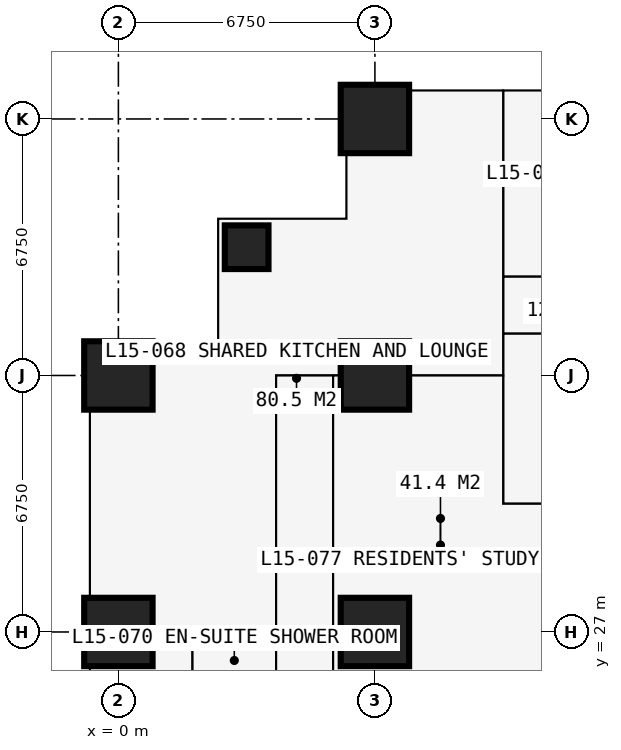
"""IFC4 building model, lengths in metres.
Left out: names, types, materials, properties, quantities, classifications, styles, units other than length and angle.
Written with IfcOpenShell. Run it as: python <this file> out.ifc"""

import sys

from ifc_helpers import new_model, si_unit, direction, frame, frame_2d, origin, origin_2d, place, context, subcontext, project, spatial, rectangle, extrude, element, fill, save


model = new_model("IFC4")
c1 = context("Model", 3, precision=1e-05, world=origin(), true_north=direction((0.0, 1.0)))
c2 = subcontext(c1, "Body", "Model", "MODEL_VIEW")
j1 = project(units=[si_unit("LENGTHUNIT", "METRE"), si_unit("PLANEANGLEUNIT", "RADIAN")], contexts=[c1])
p1 = place(None, origin())
s1 = spatial("IfcSite", under=j1, at=p1, CompositionType="ELEMENT")
p2 = place(p1, origin())
s2 = spatial("IfcBuilding", under=s1, at=p2, CompositionType="ELEMENT")
p3 = place(p2, frame((0.0, 0.0, 57.6)))
s3 = spatial("IfcBuildingStorey", under=s2, at=p3, CompositionType="ELEMENT", Elevation=57.6)
for number, where, z_axis, x_axis in (
    (1, (0.0, 27.0, 0.0), (0.0, 0.0, 1.0), (1.0, 0.0, 0.0)),
    (2, (0.0, 33.75, 0.0), (0.0, 0.0, 1.0), (1.0, 0.0, 0.0)),
):
    element("IfcColumn", number, at=place(p3, frame(where, z_axis=z_axis, x_axis=x_axis)), inside=s3, PredefinedType="COLUMN", context=c2, shape_type="SweptSolid", body=[
        extrude(rectangle(XDim=1.8, YDim=1.8, at=origin_2d()), origin(), (0.0, 0.0, 1.0), 3.6),
    ])
p4 = place(p3, frame((3.375, 37.125, 0.0), z_axis=(0.0, 0.0, 1.0), x_axis=(1.0, 0.0, 0.0)))
e3 = element("IfcColumn", 3, at=p4, inside=s3, PredefinedType="COLUMN", context=c2, shape_type="SweptSolid", body=[
    extrude(rectangle(XDim=1.15, YDim=1.15, at=origin_2d()), origin(), (0.0, 0.0, 1.0), 3.6),
])
for number, where, z_axis, x_axis in (
    (4, (6.75, 27.0, 0.0), (0.0, 0.0, 1.0), (1.0, 0.0, 0.0)),
    (5, (6.75, 33.75, 0.0), (0.0, 0.0, 1.0), (1.0, 0.0, 0.0)),
    (6, (6.75, 40.5, 0.0), (0.0, 0.0, 1.0), (1.0, 0.0, 0.0)),
):
    element("IfcColumn", number, at=place(p3, frame(where, z_axis=z_axis, x_axis=x_axis)), inside=s3, PredefinedType="COLUMN", context=c2, shape_type="SweptSolid", body=[
        extrude(rectangle(XDim=1.8, YDim=1.8, at=origin_2d()), origin(), (0.0, 0.0, 1.0), 3.6),
    ])
p5 = place(p3, frame((6.0, 41.25, 0.0), z_axis=(0.0, 0.0, 1.0), x_axis=(0.0, -1.0, 0.0)))
e7 = element("IfcWall", 7, at=p5, inside=s3, PredefinedType="SOLIDWALL", context=c2, shape_type="SweptSolid", body=[
    extrude(rectangle(XDim=3.375, YDim=0.3, at=frame_2d((1.688, 0.0))), origin(), (0.0, 0.0, 1.0), 3.375),
])
p6 = place(p5, frame((1.833, 0.0, 0.9)))
e8 = element("IfcOpeningElement", 8, at=p6, cuts=e7, PredefinedType="OPENING", context=c2, shape_type="SweptSolid", body=[
    extrude(rectangle(XDim=1.2, YDim=1.8, at=frame_2d((0.6, 0.9))), frame((0.0, 0.16, 0.0), z_axis=(0.0, -1.0, 0.0), x_axis=(1.0, 0.0, 0.0)), (0.0, 0.0, 1.0), 0.32),
])
p7 = place(p3, frame((6.0, 37.875, 0.0), z_axis=(0.0, 0.0, 1.0), x_axis=(-1.0, 0.0, 0.0)))
e9 = element("IfcWall", 9, at=p7, inside=s3, PredefinedType="SOLIDWALL", context=c2, shape_type="SweptSolid", body=[
    extrude(rectangle(XDim=3.375, YDim=0.3, at=frame_2d((1.688, 0.0))), origin(), (0.0, 0.0, 1.0), 3.375),
])
p8 = place(p7, frame((0.788, 0.0, 0.6)))
e10 = element("IfcOpeningElement", 10, at=p8, cuts=e9, PredefinedType="OPENING", context=c2, shape_type="SweptSolid", body=[
    extrude(rectangle(XDim=1.8, YDim=2.1, at=frame_2d((0.9, 1.05))), frame((0.0, 0.16, 0.0), z_axis=(0.0, -1.0, 0.0), x_axis=(1.0, 0.0, 0.0)), (0.0, 0.0, 1.0), 0.32),
])
p9 = place(p3, frame((2.625, 37.875, 0.0), z_axis=(0.0, 0.0, 1.0), x_axis=(0.0, -1.0, 0.0)))
e11 = element("IfcWall", 11, at=p9, inside=s3, PredefinedType="SOLIDWALL", context=c2, shape_type="SweptSolid", body=[
    extrude(rectangle(XDim=3.375, YDim=0.3, at=frame_2d((1.688, 0.0))), origin(), (0.0, 0.0, 1.0), 3.375),
])
p10 = place(p9, frame((0.788, 0.0, 0.6)))
e12 = element("IfcOpeningElement", 12, at=p10, cuts=e11, PredefinedType="OPENING", context=c2, shape_type="SweptSolid", body=[
    extrude(rectangle(XDim=1.8, YDim=2.1, at=frame_2d((0.9, 1.05))), frame((0.0, 0.16, 0.0), z_axis=(0.0, -1.0, 0.0), x_axis=(1.0, 0.0, 0.0)), (0.0, 0.0, 1.0), 0.32),
])
p11 = place(p3, frame((2.625, 34.5, 0.0), z_axis=(0.0, 0.0, 1.0), x_axis=(-1.0, 0.0, 0.0)))
e13 = element("IfcWall", 13, at=p11, inside=s3, PredefinedType="SOLIDWALL", context=c2, shape_type="SweptSolid", body=[
    extrude(rectangle(XDim=3.375, YDim=0.3, at=frame_2d((1.688, 0.0))), origin(), (0.0, 0.0, 1.0), 3.375),
])
p12 = place(p11, frame((0.343, 0.0, 0.9)))
e14 = element("IfcOpeningElement", 14, at=p12, cuts=e13, PredefinedType="OPENING", context=c2, shape_type="SweptSolid", body=[
    extrude(rectangle(XDim=1.2, YDim=1.8, at=frame_2d((0.6, 0.9))), frame((0.0, 0.16, 0.0), z_axis=(0.0, -1.0, 0.0), x_axis=(1.0, 0.0, 0.0)), (0.0, 0.0, 1.0), 0.32),
])
p13 = place(p3, frame((-0.75, 20.25, 0.0), z_axis=(0.0, 0.0, 1.0), x_axis=(0.0, 1.0, 0.0)))
e15 = element("IfcWall", 15, at=p13, inside=s3, PredefinedType="SOLIDWALL", context=c2, shape_type="SweptSolid", body=[
    extrude(rectangle(XDim=6.75, YDim=0.15, at=frame_2d((3.375, 0.0))), origin(), (0.0, 0.0, 1.0), 3.375),
])
p14 = place(p13, frame((0.962, 0.0, 0.0)))
e16 = element("IfcOpeningElement", 16, at=p14, cuts=e15, PredefinedType="OPENING", context=c2, shape_type="SweptSolid", body=[
    extrude(rectangle(XDim=1.0, YDim=2.2, at=frame_2d((0.5, 1.1))), frame((0.0, 0.085, 0.0), z_axis=(0.0, -1.0, 0.0), x_axis=(1.0, 0.0, 0.0)), (0.0, 0.0, 1.0), 0.17),
])
p15 = place(p13, frame((2.025, 0.0, 0.9)))
e17 = element("IfcOpeningElement", 17, at=p15, cuts=e15, PredefinedType="OPENING", context=c2, shape_type="SweptSolid", body=[
    extrude(rectangle(XDim=1.2, YDim=1.8, at=frame_2d((0.6, 0.9))), frame((0.0, 0.085, 0.0), z_axis=(0.0, -1.0, 0.0), x_axis=(1.0, 0.0, 0.0)), (0.0, 0.0, 1.0), 0.17),
])
p16 = place(p13, frame((4.788, 0.0, 0.0)))
e18 = element("IfcOpeningElement", 18, at=p16, cuts=e15, PredefinedType="OPENING", context=c2, shape_type="SweptSolid", body=[
    extrude(rectangle(XDim=1.0, YDim=2.2, at=frame_2d((0.5, 1.1))), frame((0.0, 0.085, 0.0), z_axis=(0.0, -1.0, 0.0), x_axis=(1.0, 0.0, 0.0)), (0.0, 0.0, 1.0), 0.17),
])
p17 = place(p13, frame((3.525, 0.0, 0.9)))
e19 = element("IfcOpeningElement", 19, at=p17, cuts=e15, PredefinedType="OPENING", context=c2, shape_type="SweptSolid", body=[
    extrude(rectangle(XDim=1.2, YDim=1.8, at=frame_2d((0.6, 0.9))), frame((0.0, 0.085, 0.0), z_axis=(0.0, -1.0, 0.0), x_axis=(1.0, 0.0, 0.0)), (0.0, 0.0, 1.0), 0.17),
])
p18 = place(p3, frame((-0.734, 27.0, 0.0), z_axis=(0.0, 0.0, 1.0), x_axis=(1.0, 0.0, 0.0)))
e20 = element("IfcWall", 20, at=p18, inside=s3, PredefinedType="PARTITIONING", context=c2, shape_type="SweptSolid", body=[
    extrude(rectangle(XDim=4.884, YDim=0.15, at=frame_2d((2.442, 0.0))), origin(), (0.0, 0.0, 1.0), 2.877),
])
p19 = place(p3, frame((1.95, 25.0, 0.0), z_axis=(0.0, 0.0, 1.0), x_axis=(0.0, 1.0, 0.0)))
e21 = element("IfcWall", 21, at=p19, inside=s3, PredefinedType="PARTITIONING", context=c2, shape_type="SweptSolid", body=[
    extrude(rectangle(XDim=2.0, YDim=0.1, at=frame_2d((1.0, 0.0))), origin(), (0.0, 0.0, 1.0), 3.375),
])
p20 = place(p3, frame((4.15, 10.125, 0.0), z_axis=(0.0, 0.0, 1.0), x_axis=(0.0, 1.0, 0.0)))
e22 = element("IfcWall", 22, at=p20, inside=s3, PredefinedType="PARTITIONING", context=c2, shape_type="SweptSolid", body=[
    extrude(rectangle(XDim=23.625, YDim=0.15, at=frame_2d((11.812, 0.0))), origin(), (0.0, 0.0, 1.0), 3.375),
])
p21 = place(p20, frame((19.775, 0.0, 0.0)))
e23 = element("IfcOpeningElement", 23, at=p21, cuts=e22, PredefinedType="OPENING", context=c2, shape_type="SweptSolid", body=[
    extrude(rectangle(XDim=1.0, YDim=2.2, at=frame_2d((0.5, 1.1))), frame((0.0, 0.085, 0.0), z_axis=(0.0, -1.0, 0.0), x_axis=(1.0, 0.0, 0.0)), (0.0, 0.0, 1.0), 0.17),
])
p22 = place(p20, frame((13.7, 0.0, 0.0)))
e24 = element("IfcOpeningElement", 24, at=p22, cuts=e22, PredefinedType="OPENING", context=c2, shape_type="SweptSolid", body=[
    extrude(rectangle(XDim=0.95, YDim=2.2, at=frame_2d((0.475, 1.1))), frame((0.0, 0.085, 0.0), z_axis=(0.0, -1.0, 0.0), x_axis=(1.0, 0.0, 0.0)), (0.0, 0.0, 1.0), 0.17),
])
p23 = place(p20, frame((4.2, 0.0, 0.0)))
e25 = element("IfcOpeningElement", 25, at=p23, cuts=e22, PredefinedType="OPENING", context=c2, shape_type="SweptSolid", body=[
    extrude(rectangle(XDim=0.95, YDim=2.2, at=frame_2d((0.475, 1.1))), frame((0.0, 0.085, 0.0), z_axis=(0.0, -1.0, 0.0), x_axis=(1.0, 0.0, 0.0)), (0.0, 0.0, 1.0), 0.17),
])
p24 = place(p20, frame((10.95, 0.0, 0.0)))
e26 = element("IfcOpeningElement", 26, at=p24, cuts=e22, PredefinedType="OPENING", context=c2, shape_type="SweptSolid", body=[
    extrude(rectangle(XDim=0.95, YDim=2.2, at=frame_2d((0.475, 1.1))), frame((0.0, 0.085, 0.0), z_axis=(0.0, -1.0, 0.0), x_axis=(1.0, 0.0, 0.0)), (0.0, 0.0, 1.0), 0.17),
])
p25 = place(p3, frame((4.15, 33.75, 0.0), z_axis=(0.0, 0.0, 1.0), x_axis=(1.0, 0.0, 0.0)))
e27 = element("IfcWall", 27, at=p25, inside=s3, PredefinedType="PARTITIONING", context=c2, shape_type="SweptSolid", body=[
    extrude(rectangle(XDim=5.975, YDim=0.15, at=frame_2d((2.988, 0.0))), origin(), (0.0, 0.0, 1.0), 2.877),
])
p26 = place(p3, frame((5.65, 25.725, 0.0), z_axis=(0.0, 0.0, 1.0), x_axis=(0.0, 1.0, 0.0)))
e28 = element("IfcWall", 28, at=p26, inside=s3, PredefinedType="PARTITIONING", context=c2, shape_type="SweptSolid", body=[
    extrude(rectangle(XDim=8.025, YDim=0.15, at=frame_2d((4.012, 0.0))), origin(), (0.0, 0.0, 1.0), 3.375),
])
p27 = place(p3, frame((10.125, 30.375, 0.0), z_axis=(0.0, 0.0, 1.0), x_axis=(0.0, 1.0, 0.0)))
e29 = element("IfcWall", 29, at=p27, inside=s3, PredefinedType="PARTITIONING", context=c2, shape_type="SweptSolid", body=[
    extrude(rectangle(XDim=10.859, YDim=0.15, at=frame_2d((5.429, 0.0))), origin(), (0.0, 0.0, 1.0), 3.375),
])
p28 = place(p3, frame((10.125, 30.375, 0.0), z_axis=(0.0, 0.0, 1.0), x_axis=(1.0, 0.0, 0.0)))
e30 = element("IfcWall", 30, at=p28, inside=s3, PredefinedType="PARTITIONING", context=c2, shape_type="SweptSolid", body=[
    extrude(rectangle(XDim=1.175, YDim=0.15, at=frame_2d((0.587, 0.0))), origin(), (0.0, 0.0, 1.0), 3.375),
])
p29 = place(p3, frame((10.125, 34.85, 0.0), z_axis=(0.0, 0.0, 1.0), x_axis=(1.0, 0.0, 0.0)))
e31 = element("IfcWall", 31, at=p29, inside=s3, PredefinedType="PARTITIONING", context=c2, shape_type="SweptSolid", body=[
    extrude(rectangle(XDim=10.762, YDim=0.15, at=frame_2d((5.381, 0.0))), origin(), (0.0, 0.0, 1.0), 3.375),
])
p30 = place(p29, frame((4.9, 0.0, 0.0)))
e32 = element("IfcOpeningElement", 32, at=p30, cuts=e31, PredefinedType="OPENING", context=c2, shape_type="SweptSolid", body=[
    extrude(rectangle(XDim=0.95, YDim=2.2, at=frame_2d((0.475, 1.1))), frame((0.0, 0.085, 0.0), z_axis=(0.0, -1.0, 0.0), x_axis=(1.0, 0.0, 0.0)), (0.0, 0.0, 1.0), 0.17),
])
p31 = place(p3, frame((10.125, 36.35, 0.0), z_axis=(0.0, 0.0, 1.0), x_axis=(1.0, 0.0, 0.0)))
e33 = element("IfcWall", 33, at=p31, inside=s3, PredefinedType="PARTITIONING", context=c2, shape_type="SweptSolid", body=[
    extrude(rectangle(XDim=23.625, YDim=0.1, at=frame_2d((11.812, 0.0))), origin(), (0.0, 0.0, 1.0), 3.375),
])
p32 = place(p31, frame((20.5, 0.0, 0.0)))
e34 = element("IfcOpeningElement", 34, at=p32, cuts=e33, PredefinedType="OPENING", context=c2, shape_type="SweptSolid", body=[
    extrude(rectangle(XDim=0.95, YDim=2.2, at=frame_2d((0.475, 1.1))), frame((0.0, 0.06, 0.0), z_axis=(0.0, -1.0, 0.0), x_axis=(1.0, 0.0, 0.0)), (0.0, 0.0, 1.0), 0.12),
])
p33 = place(p31, frame((17.125, 0.0, 0.0)))
e35 = element("IfcOpeningElement", 35, at=p33, cuts=e33, PredefinedType="OPENING", context=c2, shape_type="SweptSolid", body=[
    extrude(rectangle(XDim=0.95, YDim=2.2, at=frame_2d((0.475, 1.1))), frame((0.0, 0.06, 0.0), z_axis=(0.0, -1.0, 0.0), x_axis=(1.0, 0.0, 0.0)), (0.0, 0.0, 1.0), 0.12),
])
p34 = place(p31, frame((13.7, 0.0, 0.0)))
e36 = element("IfcOpeningElement", 36, at=p34, cuts=e33, PredefinedType="OPENING", context=c2, shape_type="SweptSolid", body=[
    extrude(rectangle(XDim=0.95, YDim=2.2, at=frame_2d((0.475, 1.1))), frame((0.0, 0.06, 0.0), z_axis=(0.0, -1.0, 0.0), x_axis=(1.0, 0.0, 0.0)), (0.0, 0.0, 1.0), 0.12),
])
p35 = place(p31, frame((0.2, 0.0, 0.0)))
e37 = element("IfcOpeningElement", 37, at=p35, cuts=e33, PredefinedType="OPENING", context=c2, shape_type="SweptSolid", body=[
    extrude(rectangle(XDim=0.95, YDim=2.2, at=frame_2d((0.475, 1.1))), frame((0.0, 0.06, 0.0), z_axis=(0.0, -1.0, 0.0), x_axis=(1.0, 0.0, 0.0)), (0.0, 0.0, 1.0), 0.12),
])
p36 = place(p31, frame((3.625, 0.0, 0.0)))
e38 = element("IfcOpeningElement", 38, at=p36, cuts=e33, PredefinedType="OPENING", context=c2, shape_type="SweptSolid", body=[
    extrude(rectangle(XDim=0.95, YDim=2.2, at=frame_2d((0.475, 1.1))), frame((0.0, 0.06, 0.0), z_axis=(0.0, -1.0, 0.0), x_axis=(1.0, 0.0, 0.0)), (0.0, 0.0, 1.0), 0.12),
])
p37 = place(p31, frame((7.0, 0.0, 0.0)))
e39 = element("IfcOpeningElement", 39, at=p37, cuts=e33, PredefinedType="OPENING", context=c2, shape_type="SweptSolid", body=[
    extrude(rectangle(XDim=0.95, YDim=2.2, at=frame_2d((0.475, 1.1))), frame((0.0, 0.06, 0.0), z_axis=(0.0, -1.0, 0.0), x_axis=(1.0, 0.0, 0.0)), (0.0, 0.0, 1.0), 0.12),
])
p38 = place(p31, frame((10.375, 0.0, 0.0)))
e40 = element("IfcOpeningElement", 40, at=p38, cuts=e33, PredefinedType="OPENING", context=c2, shape_type="SweptSolid", body=[
    extrude(rectangle(XDim=0.95, YDim=2.2, at=frame_2d((0.475, 1.1))), frame((0.0, 0.06, 0.0), z_axis=(0.0, -1.0, 0.0), x_axis=(1.0, 0.0, 0.0)), (0.0, 0.0, 1.0), 0.12),
])
p39 = place(p6, origin())
e41 = element("IfcWindow", 41, at=p39, inside=s3, PartitioningType="SINGLE_PANEL", PredefinedType="WINDOW", context=c2, shape_type="SweptSolid", body=[
    extrude(rectangle(XDim=1.2, YDim=1.8, at=frame_2d((0.6, 0.9))), frame((0.0, 0.03, 0.0), z_axis=(0.0, -1.0, 0.0), x_axis=(1.0, 0.0, 0.0)), (0.0, 0.0, 1.0), 0.06),
])
fill(e8, e41)
p40 = place(p8, origin())
e42 = element("IfcWindow", 42, at=p40, inside=s3, PartitioningType="SINGLE_PANEL", PredefinedType="WINDOW", context=c2, shape_type="SweptSolid", body=[
    extrude(rectangle(XDim=1.8, YDim=2.1, at=frame_2d((0.9, 1.05))), frame((0.0, 0.03, 0.0), z_axis=(0.0, -1.0, 0.0), x_axis=(1.0, 0.0, 0.0)), (0.0, 0.0, 1.0), 0.06),
])
fill(e10, e42)
p41 = place(p10, origin())
e43 = element("IfcWindow", 43, at=p41, inside=s3, PartitioningType="SINGLE_PANEL", PredefinedType="WINDOW", context=c2, shape_type="SweptSolid", body=[
    extrude(rectangle(XDim=1.8, YDim=2.1, at=frame_2d((0.9, 1.05))), frame((0.0, 0.03, 0.0), z_axis=(0.0, -1.0, 0.0), x_axis=(1.0, 0.0, 0.0)), (0.0, 0.0, 1.0), 0.06),
])
fill(e12, e43)
p42 = place(p12, origin())
e44 = element("IfcWindow", 44, at=p42, inside=s3, PartitioningType="SINGLE_PANEL", PredefinedType="WINDOW", context=c2, shape_type="SweptSolid", body=[
    extrude(rectangle(XDim=1.2, YDim=1.8, at=frame_2d((0.6, 0.9))), frame((0.0, 0.03, 0.0), z_axis=(0.0, -1.0, 0.0), x_axis=(1.0, 0.0, 0.0)), (0.0, 0.0, 1.0), 0.06),
])
fill(e14, e44)
p43 = place(p16, origin())
e45 = element("IfcDoor", 45, at=p43, inside=s3, OperationType="SINGLE_SWING_RIGHT", PredefinedType="DOOR", context=c2, shape_type="SweptSolid", body=[
    extrude(rectangle(XDim=1.0, YDim=2.2, at=frame_2d((0.5, 1.1))), frame((0.0, 0.025, 0.0), z_axis=(0.0, -1.0, 0.0), x_axis=(1.0, 0.0, 0.0)), (0.0, 0.0, 1.0), 0.05),
])
fill(e18, e45)
p44 = place(p35, origin())
e46 = element("IfcDoor", 46, at=p44, inside=s3, OperationType="SINGLE_SWING_LEFT", PredefinedType="DOOR", context=c2, shape_type="SweptSolid", body=[
    extrude(rectangle(XDim=0.95, YDim=2.2, at=frame_2d((0.475, 1.1))), frame((0.0, 0.025, 0.0), z_axis=(0.0, -1.0, 0.0), x_axis=(1.0, 0.0, 0.0)), (0.0, 0.0, 1.0), 0.05),
])
fill(e37, e46)
p45 = place(p21, origin())
e47 = element("IfcDoor", 47, at=p45, inside=s3, OperationType="SINGLE_SWING_LEFT", PredefinedType="DOOR", context=c2, shape_type="SweptSolid", body=[
    extrude(rectangle(XDim=1.0, YDim=2.2, at=frame_2d((0.5, 1.1))), frame((0.0, 0.025, 0.0), z_axis=(0.0, -1.0, 0.0), x_axis=(1.0, 0.0, 0.0)), (0.0, 0.0, 1.0), 0.05),
])
fill(e23, e47)
save(model, sys.argv[1])
